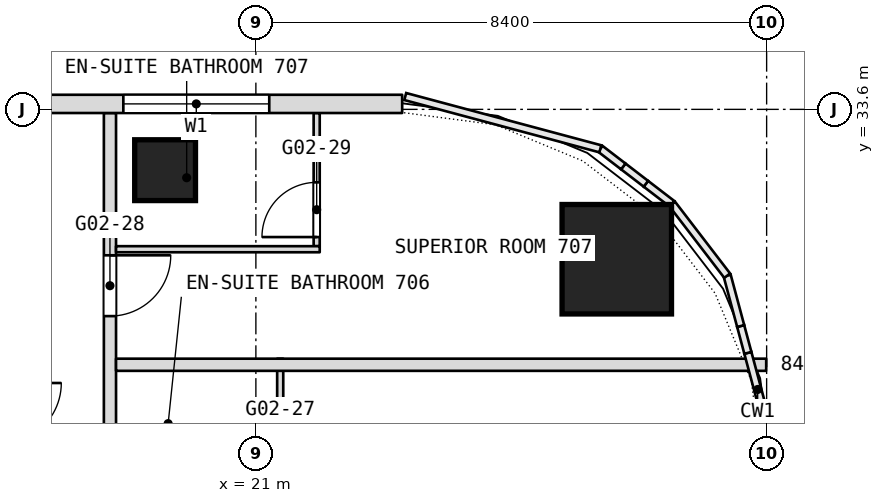
"""IFC4 building model, lengths in metres.
Left out: names, types, materials, properties, quantities, classifications, styles, units other than length and angle.
Written with IfcOpenShell. Run it as: python <this file> out.ifc"""

import sys

from ifc_helpers import new_model, si_unit, direction, frame, frame_2d, origin, origin_2d, place, context, subcontext, project, spatial, rectangle, extrude, element, fill, save


model = new_model("IFC4")
c1 = context("Model", 3, precision=1e-05, world=origin(), true_north=direction((0.0, 1.0)))
c2 = subcontext(c1, "Body", "Model", "MODEL_VIEW")
j1 = project(units=[si_unit("LENGTHUNIT", "METRE"), si_unit("PLANEANGLEUNIT", "RADIAN")], contexts=[c1])
p1 = place(None, origin())
s1 = spatial("IfcSite", under=j1, at=p1, CompositionType="ELEMENT")
p2 = place(p1, origin())
s2 = spatial("IfcBuilding", under=s1, at=p2, CompositionType="ELEMENT")
p3 = place(p2, frame((0.0, 0.0, 40.1)))
s3 = spatial("IfcBuildingStorey", under=s2, at=p3, CompositionType="ELEMENT", Elevation=40.1)
p4 = place(p3, frame((26.936, 31.135, 0.0), z_axis=(0.0, 0.0, 1.0), x_axis=(1.0, 0.0, 0.0)))
e1 = element("IfcColumn", 1, at=p4, inside=s3, PredefinedType="COLUMN", context=c2, shape_type="SweptSolid", body=[
    extrude(rectangle(XDim=1.8, YDim=1.8, at=origin_2d()), origin(), (0.0, 0.0, 1.0), 3.6),
])
p5 = place(p3, frame((19.507, 32.6, 0.0), z_axis=(0.0, 0.0, 1.0), x_axis=(1.0, 0.0, 0.0)))
e2 = element("IfcColumn", 2, at=p5, inside=s3, PredefinedType="COLUMN", context=c2, shape_type="SweptSolid", body=[
    extrude(rectangle(XDim=1.0, YDim=1.0, at=origin_2d()), origin(), (0.0, 0.0, 1.0), 3.6),
])
p6 = place(p3, frame((22.0, 31.35, 0.0), z_axis=(0.0, 0.0, 1.0), x_axis=(0.0, 1.0, 0.0)))
e3 = element("IfcWall", 3, at=p6, inside=s3, PredefinedType="PARTITIONING", context=c2, shape_type="SweptSolid", body=[
    extrude(rectangle(XDim=2.19, YDim=0.1, at=frame_2d((1.095, 0.0))), origin(), (0.0, 0.0, 1.0), 3.34),
])
p7 = place(p6, frame((0.15, 0.0, 0.0)))
e4 = element("IfcOpeningElement", 4, at=p7, cuts=e3, PredefinedType="OPENING", context=c2, shape_type="SweptSolid", body=[
    extrude(rectangle(XDim=0.9, YDim=2.1, at=frame_2d((0.45, 1.05))), frame((0.0, 0.05, 0.0), z_axis=(0.0, -1.0, 0.0), x_axis=(1.0, 0.0, 0.0)), (0.0, 0.0, 1.0), 0.1),
])
p8 = place(p3, frame((21.4, 27.05, 0.0), z_axis=(0.0, 0.0, 1.0), x_axis=(0.0, 1.0, 0.0)))
e5 = element("IfcWall", 5, at=p8, inside=s3, PredefinedType="PARTITIONING", context=c2, shape_type="SweptSolid", body=[
    extrude(rectangle(XDim=2.45, YDim=0.1, at=frame_2d((1.225, 0.0))), origin(), (0.0, 0.0, 1.0), 3.34),
])
p9 = place(p8, frame((0.15, 0.0, 0.0)))
e6 = element("IfcOpeningElement", 6, at=p9, cuts=e5, PredefinedType="OPENING", context=c2, shape_type="SweptSolid", body=[
    extrude(rectangle(XDim=0.9, YDim=2.1, at=frame_2d((0.45, 1.05))), frame((0.0, 0.05, 0.0), z_axis=(0.0, -1.0, 0.0), x_axis=(1.0, 0.0, 0.0)), (0.0, 0.0, 1.0), 0.1),
])
p10 = place(p3, frame((18.6, -16.665, 0.0), z_axis=(0.0, 0.0, 1.0), x_axis=(0.0, 1.0, 0.0)))
e7 = element("IfcWall", 7, at=p10, inside=s3, PredefinedType="PARTITIONING", context=c2, shape_type="SweptSolid", body=[
    extrude(rectangle(XDim=50.205, YDim=0.2, at=frame_2d((25.103, 0.0))), origin(), (0.0, 0.0, 1.0), 3.34),
])
p11 = place(p10, frame((4.0, 0.0, 0.0)))
e8 = element("IfcOpeningElement", 8, at=p11, cuts=e7, PredefinedType="OPENING", context=c2, shape_type="SweptSolid", body=[
    extrude(rectangle(XDim=1.1, YDim=2.1, at=frame_2d((0.55, 1.05))), frame((0.0, 0.1, 0.0), z_axis=(0.0, -1.0, 0.0), x_axis=(1.0, 0.0, 0.0)), (0.0, 0.0, 1.0), 0.2),
])
p12 = place(p10, frame((9.815, 0.0, 0.0)))
e9 = element("IfcOpeningElement", 9, at=p12, cuts=e7, PredefinedType="OPENING", context=c2, shape_type="SweptSolid", body=[
    extrude(rectangle(XDim=1.1, YDim=2.1, at=frame_2d((0.55, 1.05))), frame((0.0, 0.1, 0.0), z_axis=(0.0, -1.0, 0.0), x_axis=(1.0, 0.0, 0.0)), (0.0, 0.0, 1.0), 0.2),
])
p13 = place(p10, frame((19.965, 0.0, 0.0)))
e10 = element("IfcOpeningElement", 10, at=p13, cuts=e7, PredefinedType="OPENING", context=c2, shape_type="SweptSolid", body=[
    extrude(rectangle(XDim=1.8, YDim=2.1, at=frame_2d((0.9, 1.05))), frame((0.0, 0.1, 0.0), z_axis=(0.0, -1.0, 0.0), x_axis=(1.0, 0.0, 0.0)), (0.0, 0.0, 1.0), 0.2),
])
p14 = place(p10, frame((25.465, 0.0, 0.0)))
e11 = element("IfcOpeningElement", 11, at=p14, cuts=e7, PredefinedType="OPENING", context=c2, shape_type="SweptSolid", body=[
    extrude(rectangle(XDim=1.0, YDim=2.1, at=frame_2d((0.5, 1.05))), frame((0.0, 0.1, 0.0), z_axis=(0.0, -1.0, 0.0), x_axis=(1.0, 0.0, 0.0)), (0.0, 0.0, 1.0), 0.2),
])
p15 = place(p10, frame((32.065, 0.0, 0.0)))
e12 = element("IfcOpeningElement", 12, at=p15, cuts=e7, PredefinedType="OPENING", context=c2, shape_type="SweptSolid", body=[
    extrude(rectangle(XDim=1.0, YDim=2.1, at=frame_2d((0.5, 1.05))), frame((0.0, 0.1, 0.0), z_axis=(0.0, -1.0, 0.0), x_axis=(1.0, 0.0, 0.0)), (0.0, 0.0, 1.0), 0.2),
])
p16 = place(p10, frame((37.165, 0.0, 0.0)))
e13 = element("IfcOpeningElement", 13, at=p16, cuts=e7, PredefinedType="OPENING", context=c2, shape_type="SweptSolid", body=[
    extrude(rectangle(XDim=1.1, YDim=2.1, at=frame_2d((0.55, 1.05))), frame((0.0, 0.1, 0.0), z_axis=(0.0, -1.0, 0.0), x_axis=(1.0, 0.0, 0.0)), (0.0, 0.0, 1.0), 0.2),
])
p17 = place(p10, frame((42.265, 0.0, 0.0)))
e14 = element("IfcOpeningElement", 14, at=p17, cuts=e7, PredefinedType="OPENING", context=c2, shape_type="SweptSolid", body=[
    extrude(rectangle(XDim=1.0, YDim=2.1, at=frame_2d((0.5, 1.05))), frame((0.0, 0.1, 0.0), z_axis=(0.0, -1.0, 0.0), x_axis=(1.0, 0.0, 0.0)), (0.0, 0.0, 1.0), 0.2),
])
p18 = place(p10, frame((46.865, 0.0, 0.0)))
e15 = element("IfcOpeningElement", 15, at=p18, cuts=e7, PredefinedType="OPENING", context=c2, shape_type="SweptSolid", body=[
    extrude(rectangle(XDim=1.0, YDim=2.1, at=frame_2d((0.5, 1.05))), frame((0.0, 0.1, 0.0), z_axis=(0.0, -1.0, 0.0), x_axis=(1.0, 0.0, 0.0)), (0.0, 0.0, 1.0), 0.2),
])
p19 = place(p3, frame((18.7, 29.4, 0.0), z_axis=(0.0, 0.0, 1.0), x_axis=(1.0, 0.0, 0.0)))
e16 = element("IfcWall", 16, at=p19, inside=s3, PredefinedType="PARTITIONING", context=c2, shape_type="SweptSolid", body=[
    extrude(rectangle(XDim=10.693, YDim=0.2, at=frame_2d((5.347, 0.0))), origin(), (0.0, 0.0, 1.0), 3.34),
])
p20 = place(p3, frame((18.7, 31.3, 0.0), z_axis=(0.0, 0.0, 1.0), x_axis=(1.0, 0.0, 0.0)))
e17 = element("IfcWall", 17, at=p20, inside=s3, PredefinedType="PARTITIONING", context=c2, shape_type="SweptSolid", body=[
    extrude(rectangle(XDim=3.35, YDim=0.1, at=frame_2d((1.675, 0.0))), origin(), (0.0, 0.0, 1.0), 3.34),
])
p21 = place(p3, frame((23.406, 33.69, 0.0), z_axis=(0.0, 0.0, 1.0), x_axis=(-1.0, 0.0, 0.0)))
e18 = element("IfcWall", 18, at=p21, inside=s3, PredefinedType="NOTDEFINED", context=c2, shape_type="SweptSolid", body=[
    extrude(rectangle(XDim=46.812, YDim=0.3, at=frame_2d((23.406, 0.0))), origin(), (0.0, 0.0, 1.0), 3.6),
])
p22 = place(p21, frame((2.186, 0.0, 0.9)))
e19 = element("IfcOpeningElement", 19, at=p22, cuts=e18, PredefinedType="OPENING", context=c2, shape_type="SweptSolid", body=[
    extrude(rectangle(XDim=2.4, YDim=2.1, at=frame_2d((1.2, 1.05))), frame((0.0, 0.15, 0.0), z_axis=(0.0, -1.0, 0.0), x_axis=(1.0, 0.0, 0.0)), (0.0, 0.0, 1.0), 0.3),
])
p23 = place(p21, frame((7.506, 0.0, 0.9)))
e20 = element("IfcOpeningElement", 20, at=p23, cuts=e18, PredefinedType="OPENING", context=c2, shape_type="SweptSolid", body=[
    extrude(rectangle(XDim=2.4, YDim=2.1, at=frame_2d((1.2, 1.05))), frame((0.0, 0.15, 0.0), z_axis=(0.0, -1.0, 0.0), x_axis=(1.0, 0.0, 0.0)), (0.0, 0.0, 1.0), 0.3),
])
p24 = place(p21, frame((11.706, 0.0, 0.9)))
e21 = element("IfcOpeningElement", 21, at=p24, cuts=e18, PredefinedType="OPENING", context=c2, shape_type="SweptSolid", body=[
    extrude(rectangle(XDim=2.4, YDim=2.1, at=frame_2d((1.2, 1.05))), frame((0.0, 0.15, 0.0), z_axis=(0.0, -1.0, 0.0), x_axis=(1.0, 0.0, 0.0)), (0.0, 0.0, 1.0), 0.3),
])
p25 = place(p21, frame((15.906, 0.0, 0.9)))
e22 = element("IfcOpeningElement", 22, at=p25, cuts=e18, PredefinedType="OPENING", context=c2, shape_type="SweptSolid", body=[
    extrude(rectangle(XDim=2.4, YDim=2.1, at=frame_2d((1.2, 1.05))), frame((0.0, 0.15, 0.0), z_axis=(0.0, -1.0, 0.0), x_axis=(1.0, 0.0, 0.0)), (0.0, 0.0, 1.0), 0.3),
])
p26 = place(p21, frame((20.106, 0.0, 0.9)))
e23 = element("IfcOpeningElement", 23, at=p26, cuts=e18, PredefinedType="OPENING", context=c2, shape_type="SweptSolid", body=[
    extrude(rectangle(XDim=2.4, YDim=2.1, at=frame_2d((1.2, 1.05))), frame((0.0, 0.15, 0.0), z_axis=(0.0, -1.0, 0.0), x_axis=(1.0, 0.0, 0.0)), (0.0, 0.0, 1.0), 0.3),
])
p27 = place(p21, frame((24.306, 0.0, 0.9)))
e24 = element("IfcOpeningElement", 24, at=p27, cuts=e18, PredefinedType="OPENING", context=c2, shape_type="SweptSolid", body=[
    extrude(rectangle(XDim=2.4, YDim=2.1, at=frame_2d((1.2, 1.05))), frame((0.0, 0.15, 0.0), z_axis=(0.0, -1.0, 0.0), x_axis=(1.0, 0.0, 0.0)), (0.0, 0.0, 1.0), 0.3),
])
p28 = place(p21, frame((28.506, 0.0, 0.9)))
e25 = element("IfcOpeningElement", 25, at=p28, cuts=e18, PredefinedType="OPENING", context=c2, shape_type="SweptSolid", body=[
    extrude(rectangle(XDim=2.4, YDim=2.1, at=frame_2d((1.2, 1.05))), frame((0.0, 0.15, 0.0), z_axis=(0.0, -1.0, 0.0), x_axis=(1.0, 0.0, 0.0)), (0.0, 0.0, 1.0), 0.3),
])
p29 = place(p21, frame((32.706, 0.0, 0.9)))
e26 = element("IfcOpeningElement", 26, at=p29, cuts=e18, PredefinedType="OPENING", context=c2, shape_type="SweptSolid", body=[
    extrude(rectangle(XDim=2.4, YDim=2.1, at=frame_2d((1.2, 1.05))), frame((0.0, 0.15, 0.0), z_axis=(0.0, -1.0, 0.0), x_axis=(1.0, 0.0, 0.0)), (0.0, 0.0, 1.0), 0.3),
])
p30 = place(p21, frame((36.906, 0.0, 0.9)))
e27 = element("IfcOpeningElement", 27, at=p30, cuts=e18, PredefinedType="OPENING", context=c2, shape_type="SweptSolid", body=[
    extrude(rectangle(XDim=2.4, YDim=2.1, at=frame_2d((1.2, 1.05))), frame((0.0, 0.15, 0.0), z_axis=(0.0, -1.0, 0.0), x_axis=(1.0, 0.0, 0.0)), (0.0, 0.0, 1.0), 0.3),
])
p31 = place(p21, frame((42.226, 0.0, 0.9)))
e28 = element("IfcOpeningElement", 28, at=p31, cuts=e18, PredefinedType="OPENING", context=c2, shape_type="SweptSolid", body=[
    extrude(rectangle(XDim=2.4, YDim=2.1, at=frame_2d((1.2, 1.05))), frame((0.0, 0.15, 0.0), z_axis=(0.0, -1.0, 0.0), x_axis=(1.0, 0.0, 0.0)), (0.0, 0.0, 1.0), 0.3),
])
p32 = place(p7, origin())
e29 = element("IfcDoor", 29, at=p32, inside=s3, OperationType="SINGLE_SWING_LEFT", PredefinedType="DOOR", context=c2, shape_type="SweptSolid", body=[
    extrude(rectangle(XDim=0.9, YDim=2.1, at=frame_2d((0.45, 1.05))), frame((0.0, 0.025, 0.0), z_axis=(0.0, -1.0, 0.0), x_axis=(1.0, 0.0, 0.0)), (0.0, 0.0, 1.0), 0.05),
])
fill(e4, e29)
p33 = place(p18, origin())
e30 = element("IfcDoor", 30, at=p33, inside=s3, OperationType="SINGLE_SWING_LEFT", PredefinedType="DOOR", context=c2, shape_type="SweptSolid", body=[
    extrude(rectangle(XDim=1.0, YDim=2.1, at=frame_2d((0.5, 1.05))), frame((0.0, 0.025, 0.0), z_axis=(0.0, -1.0, 0.0), x_axis=(1.0, 0.0, 0.0)), (0.0, 0.0, 1.0), 0.05),
])
fill(e15, e30)
p34 = place(p22, origin())
e31 = element("IfcWindow", 31, at=p34, inside=s3, PartitioningType="SINGLE_PANEL", PredefinedType="WINDOW", context=c2, shape_type="SweptSolid", body=[
    extrude(rectangle(XDim=2.4, YDim=2.1, at=frame_2d((1.2, 1.05))), frame((0.0, 0.03, 0.0), z_axis=(0.0, -1.0, 0.0), x_axis=(1.0, 0.0, 0.0)), (0.0, 0.0, 1.0), 0.06),
])
fill(e19, e31)
save(model, sys.argv[1])
